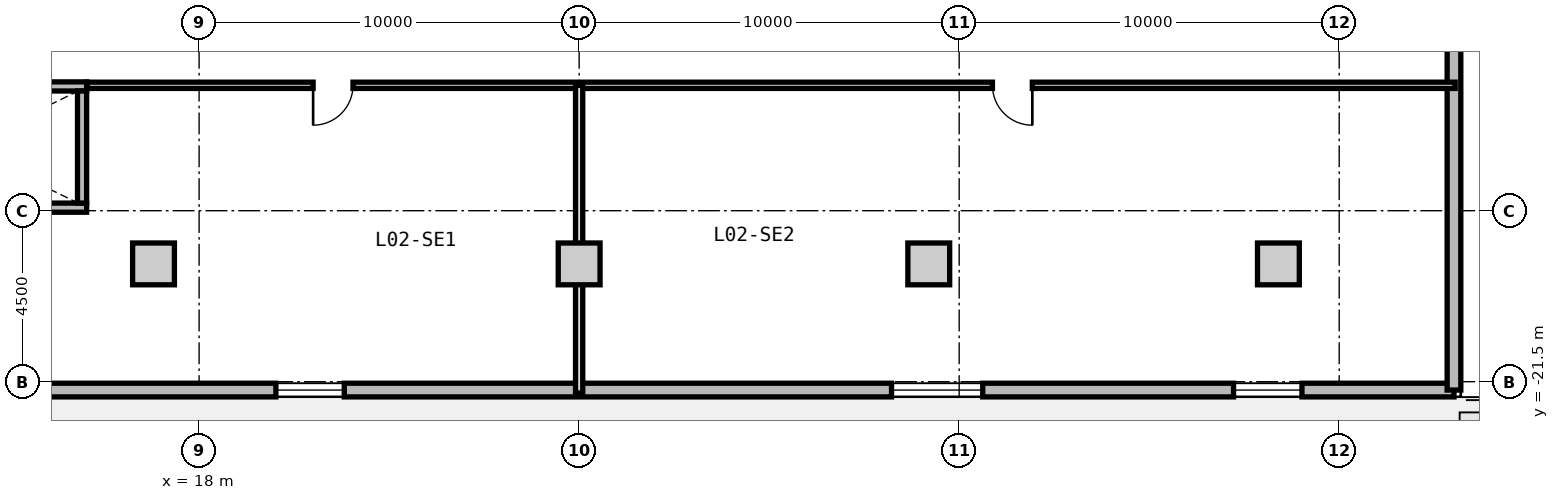
"""IFC4 building model, lengths in metres.
Left out: names, types, materials, properties, quantities, classifications, styles, units other than length and angle.
Written with IfcOpenShell. Run it as: python <this file> out.ifc"""

import sys

from ifc_helpers import new_model, si_unit, direction, frame, frame_2d, origin, origin_2d, place, context, subcontext, project, spatial, rectangle, extrude, source, transform, mapped, element, fill, save


model = new_model("IFC4")
c1 = context("Model", 3, precision=1e-05, world=origin(), true_north=direction((0.0, 1.0)))
c2 = subcontext(c1, "Body", "Model", "MODEL_VIEW")
j1 = project(units=[si_unit("LENGTHUNIT", "METRE"), si_unit("PLANEANGLEUNIT", "RADIAN")], contexts=[c1])
p1 = place(None, origin())
s1 = spatial("IfcSite", under=j1, at=p1, CompositionType="ELEMENT")
p2 = place(p1, origin())
s2 = spatial("IfcBuilding", under=s1, at=p2, CompositionType="ELEMENT")
p3 = place(p2, frame((0.0, 0.0, 8.4)))
s3 = spatial("IfcBuildingStorey", under=s2, at=p3, CompositionType="ELEMENT", Elevation=8.4)
m1 = source(origin(), c2, "Body", "SweptSolid", [
    extrude(rectangle(XDim=1.1, YDim=1.1, at=origin_2d()), origin(), (0.0, 0.0, 1.0), 4.2),
])
for number, where, z_axis, x_axis in (
    (1, (16.8, -18.4, 0.0), (0.0, 0.0, 1.0), (1.0, 0.0, 0.0)),
    (2, (28.0, -18.4, 0.0), (0.0, 0.0, 1.0), (1.0, 0.0, 0.0)),
    (3, (37.2, -18.4, 0.0), (0.0, 0.0, 1.0), (1.0, 0.0, 0.0)),
    (4, (46.4, -18.4, 0.0), (0.0, 0.0, 1.0), (1.0, 0.0, 0.0)),
):
    element("IfcColumn", number, at=place(p3, frame(where, z_axis=z_axis, x_axis=x_axis)), inside=s3, PredefinedType="COLUMN", context=c2, shape_type="MappedRepresentation", body=[
        mapped(m1, transform((0.0, 0.0, 0.0), x_axis=(1.0, 0.0, 0.0), y_axis=(0.0, 1.0, 0.0), z_axis=(0.0, 0.0, 1.0), scale=1.0)),
    ])
m2 = source(origin(), c2, "Body", "SweptSolid", [
    extrude(rectangle(XDim=102.04, YDim=0.36, at=frame_2d((51.02, 0.0))), origin(), (0.0, 0.0, 1.0), 3.88),
])
p4 = place(p3, frame((51.02, -21.72, 0.0), z_axis=(0.0, 0.0, 1.0), x_axis=(-1.0, 0.0, 0.0)))
e5 = element("IfcWall", 5, at=p4, inside=s3, PredefinedType="SOLIDWALL", context=c2, shape_type="MappedRepresentation", body=[
    mapped(m2, transform((0.0, 0.0, 0.0), x_axis=(1.0, 0.0, 0.0), y_axis=(0.0, 1.0, 0.0), z_axis=(0.0, 0.0, 1.0), scale=1.0)),
])
p5 = place(p4, frame((53.37, 0.0, 0.0)))
e6 = element("IfcOpeningElement", 6, at=p5, cuts=e5, PredefinedType="OPENING", context=c2, shape_type="SweptSolid", body=[
    extrude(rectangle(XDim=1.15, YDim=2.25, at=frame_2d((0.575, 1.125))), frame((0.0, 0.19, 0.0), z_axis=(0.0, -1.0, 0.0), x_axis=(1.0, 0.0, 0.0)), (0.0, 0.0, 1.0), 0.38),
])
p6 = place(p4, frame((4.0, 0.0, 0.9)))
e7 = element("IfcOpeningElement", 7, at=p6, cuts=e5, PredefinedType="OPENING", context=c2, shape_type="SweptSolid", body=[
    extrude(rectangle(XDim=1.8, YDim=2.0, at=frame_2d((0.9, 1.0))), frame((0.0, 0.19, 0.0), z_axis=(0.0, -1.0, 0.0), x_axis=(1.0, 0.0, 0.0)), (0.0, 0.0, 1.0), 0.38),
])
p7 = place(p4, frame((12.4, 0.0, 0.85)))
e8 = element("IfcOpeningElement", 8, at=p7, cuts=e5, PredefinedType="OPENING", context=c2, shape_type="SweptSolid", body=[
    extrude(rectangle(XDim=2.4, YDim=2.2, at=frame_2d((1.2, 1.1))), frame((0.0, 0.19, 0.0), z_axis=(0.0, -1.0, 0.0), x_axis=(1.0, 0.0, 0.0)), (0.0, 0.0, 1.0), 0.38),
])
p8 = place(p4, frame((29.2, 0.0, 0.9)))
e9 = element("IfcOpeningElement", 9, at=p8, cuts=e5, PredefinedType="OPENING", context=c2, shape_type="SweptSolid", body=[
    extrude(rectangle(XDim=1.8, YDim=2.0, at=frame_2d((0.9, 1.0))), frame((0.0, 0.19, 0.0), z_axis=(0.0, -1.0, 0.0), x_axis=(1.0, 0.0, 0.0)), (0.0, 0.0, 1.0), 0.38),
])
p9 = place(p4, frame((37.6, 0.0, 0.85)))
e10 = element("IfcOpeningElement", 10, at=p9, cuts=e5, PredefinedType="OPENING", context=c2, shape_type="SweptSolid", body=[
    extrude(rectangle(XDim=2.4, YDim=2.2, at=frame_2d((1.2, 1.1))), frame((0.0, 0.19, 0.0), z_axis=(0.0, -1.0, 0.0), x_axis=(1.0, 0.0, 0.0)), (0.0, 0.0, 1.0), 0.38),
])
p10 = place(p4, frame((62.8, 0.0, 0.85)))
e11 = element("IfcOpeningElement", 11, at=p10, cuts=e5, PredefinedType="OPENING", context=c2, shape_type="SweptSolid", body=[
    extrude(rectangle(XDim=2.4, YDim=2.2, at=frame_2d((1.2, 1.1))), frame((0.0, 0.19, 0.0), z_axis=(0.0, -1.0, 0.0), x_axis=(1.0, 0.0, 0.0)), (0.0, 0.0, 1.0), 0.38),
])
p11 = place(p4, frame((71.2, 0.0, 0.85)))
e12 = element("IfcOpeningElement", 12, at=p11, cuts=e5, PredefinedType="OPENING", context=c2, shape_type="SweptSolid", body=[
    extrude(rectangle(XDim=3.0, YDim=2.1, at=frame_2d((1.5, 1.05))), frame((0.0, 0.19, 0.0), z_axis=(0.0, -1.0, 0.0), x_axis=(1.0, 0.0, 0.0)), (0.0, 0.0, 1.0), 0.38),
])
p12 = place(p4, frame((88.0, 0.0, 0.85)))
e13 = element("IfcOpeningElement", 13, at=p12, cuts=e5, PredefinedType="OPENING", context=c2, shape_type="SweptSolid", body=[
    extrude(rectangle(XDim=2.4, YDim=2.2, at=frame_2d((1.2, 1.1))), frame((0.0, 0.19, 0.0), z_axis=(0.0, -1.0, 0.0), x_axis=(1.0, 0.0, 0.0)), (0.0, 0.0, 1.0), 0.38),
])
m3 = source(origin(), c2, "Body", "SweptSolid", [
    extrude(rectangle(XDim=43.44, YDim=0.36, at=frame_2d((21.72, 0.0))), origin(), (0.0, 0.0, 1.0), 3.88),
])
p13 = place(p3, frame((51.02, 21.72, 0.0), z_axis=(0.0, 0.0, 1.0), x_axis=(0.0, -1.0, 0.0)))
e14 = element("IfcWall", 14, at=p13, inside=s3, PredefinedType="SOLIDWALL", context=c2, shape_type="MappedRepresentation", body=[
    mapped(m3, transform((0.0, 0.0, 0.0), x_axis=(1.0, 0.0, 0.0), y_axis=(0.0, 1.0, 0.0), z_axis=(0.0, 0.0, 1.0), scale=1.0)),
])
p14 = place(p13, frame((4.0, 0.0, 0.9)))
e15 = element("IfcOpeningElement", 15, at=p14, cuts=e14, PredefinedType="OPENING", context=c2, shape_type="SweptSolid", body=[
    extrude(rectangle(XDim=1.8, YDim=2.0, at=frame_2d((0.9, 1.0))), frame((0.0, 0.19, 0.0), z_axis=(0.0, -1.0, 0.0), x_axis=(1.0, 0.0, 0.0)), (0.0, 0.0, 1.0), 0.38),
])
p15 = place(p13, frame((29.2, 0.0, 0.9)))
e16 = element("IfcOpeningElement", 16, at=p15, cuts=e14, PredefinedType="OPENING", context=c2, shape_type="SweptSolid", body=[
    extrude(rectangle(XDim=1.8, YDim=2.0, at=frame_2d((0.9, 1.0))), frame((0.0, 0.19, 0.0), z_axis=(0.0, -1.0, 0.0), x_axis=(1.0, 0.0, 0.0)), (0.0, 0.0, 1.0), 0.38),
])
m4 = source(origin(), c2, "Body", "SweptSolid", [
    extrude(rectangle(XDim=7.88, YDim=0.24, at=frame_2d((3.94, 0.0))), origin(), (0.0, 0.0, 1.0), 3.88),
])
p16 = place(p3, frame((7.16, -13.73, 0.0), z_axis=(0.0, 0.0, 1.0), x_axis=(1.0, 0.0, 0.0)))
e17 = element("IfcWall", 17, at=p16, inside=s3, PredefinedType="PARTITIONING", context=c2, shape_type="MappedRepresentation", body=[
    mapped(m4, transform((0.0, 0.0, 0.0), x_axis=(1.0, 0.0, 0.0), y_axis=(0.0, 1.0, 0.0), z_axis=(0.0, 0.0, 1.0), scale=1.0)),
])
p17 = place(p16, frame((0.37, 0.0, 0.0)))
e18 = element("IfcOpeningElement", 18, at=p17, cuts=e17, PredefinedType="OPENING", context=c2, shape_type="SweptSolid", body=[
    extrude(rectangle(XDim=1.1, YDim=2.15, at=frame_2d((0.55, 1.075))), frame((0.0, 0.13, 0.0), z_axis=(0.0, -1.0, 0.0), x_axis=(1.0, 0.0, 0.0)), (0.0, 0.0, 1.0), 0.26),
])
p18 = place(p3, frame((7.16, -16.92, 0.0), z_axis=(0.0, 0.0, 1.0), x_axis=(1.0, 0.0, 0.0)))
e19 = element("IfcWall", 19, at=p18, inside=s3, PredefinedType="PARTITIONING", context=c2, shape_type="MappedRepresentation", body=[
    mapped(m4, transform((0.0, 0.0, 0.0), x_axis=(1.0, 0.0, 0.0), y_axis=(0.0, 1.0, 0.0), z_axis=(0.0, 0.0, 1.0), scale=1.0)),
])
m5 = source(origin(), c2, "Body", "SweptSolid", [
    extrude(rectangle(XDim=2.95, YDim=0.24, at=frame_2d((1.475, 0.0))), origin(), (0.0, 0.0, 1.0), 3.88),
])
p19 = place(p3, frame((14.92, -16.8, 0.0), z_axis=(0.0, 0.0, 1.0), x_axis=(0.0, 1.0, 0.0)))
e20 = element("IfcWall", 20, at=p19, inside=s3, PredefinedType="PARTITIONING", context=c2, shape_type="MappedRepresentation", body=[
    mapped(m5, transform((0.0, 0.0, 0.0), x_axis=(1.0, 0.0, 0.0), y_axis=(0.0, 1.0, 0.0), z_axis=(0.0, 0.0, 1.0), scale=1.0)),
])
m6 = source(origin(), c2, "Body", "SweptSolid", [
    extrude(rectangle(XDim=36.0, YDim=0.165, at=frame_2d((18.0, 0.0))), origin(), (0.0, 0.0, 1.0), 3.865),
])
p20 = place(p3, frame((15.05, -13.7, 0.0), z_axis=(0.0, 0.0, 1.0), x_axis=(1.0, 0.0, 0.0)))
e21 = element("IfcWall", 21, at=p20, inside=s3, PredefinedType="PARTITIONING", context=c2, shape_type="MappedRepresentation", body=[
    mapped(m6, transform((0.0, 0.0, 0.0), x_axis=(1.0, 0.0, 0.0), y_axis=(0.0, 1.0, 0.0), z_axis=(0.0, 0.0, 1.0), scale=1.0)),
])
p21 = place(p20, frame((5.95, 0.0, 0.0)))
e22 = element("IfcOpeningElement", 22, at=p21, cuts=e21, PredefinedType="OPENING", context=c2, shape_type="SweptSolid", body=[
    extrude(rectangle(XDim=1.05, YDim=2.15, at=frame_2d((0.525, 1.075))), frame((0.0, 0.093, 0.0), z_axis=(0.0, -1.0, 0.0), x_axis=(1.0, 0.0, 0.0)), (0.0, 0.0, 1.0), 0.185),
])
p22 = place(p20, frame((23.825, 0.0, 0.0)))
e23 = element("IfcOpeningElement", 23, at=p22, cuts=e21, PredefinedType="OPENING", context=c2, shape_type="SweptSolid", body=[
    extrude(rectangle(XDim=1.05, YDim=2.15, at=frame_2d((0.525, 1.075))), frame((0.0, 0.093, 0.0), z_axis=(0.0, -1.0, 0.0), x_axis=(1.0, 0.0, 0.0)), (0.0, 0.0, 1.0), 0.185),
])
m7 = source(origin(), c2, "Body", "SweptSolid", [
    extrude(rectangle(XDim=8.1, YDim=0.19, at=frame_2d((4.05, 0.0))), origin(), (0.0, 0.0, 1.0), 3.865),
])
p23 = place(p3, frame((28.0, -21.8, 0.0), z_axis=(0.0, 0.0, 1.0), x_axis=(0.0, 1.0, 0.0)))
e24 = element("IfcWall", 24, at=p23, inside=s3, PredefinedType="PARTITIONING", context=c2, shape_type="MappedRepresentation", body=[
    mapped(m7, transform((0.0, 0.0, 0.0), x_axis=(1.0, 0.0, 0.0), y_axis=(0.0, 1.0, 0.0), z_axis=(0.0, 0.0, 1.0), scale=1.0)),
])
m8 = source(origin(), c2, "Body", "SweptSolid", [
    extrude(rectangle(XDim=1.8, YDim=2.0, at=frame_2d((0.9, 1.0))), frame((0.0, 0.03, 0.0), z_axis=(0.0, -1.0, 0.0), x_axis=(1.0, 0.0, 0.0)), (0.0, 0.0, 1.0), 0.06),
])
p24 = place(p6, origin())
e25 = element("IfcWindow", 25, at=p24, inside=s3, PartitioningType="SINGLE_PANEL", PredefinedType="WINDOW", context=c2, shape_type="MappedRepresentation", body=[
    mapped(m8, transform((0.0, 0.0, 0.0), x_axis=(1.0, 0.0, 0.0), y_axis=(0.0, 1.0, 0.0), z_axis=(0.0, 0.0, 1.0), scale=1.0)),
])
fill(e7, e25)
m9 = source(origin(), c2, "Body", "SweptSolid", [
    extrude(rectangle(XDim=2.4, YDim=2.2, at=frame_2d((1.2, 1.1))), frame((0.0, 0.03, 0.0), z_axis=(0.0, -1.0, 0.0), x_axis=(1.0, 0.0, 0.0)), (0.0, 0.0, 1.0), 0.06),
])
p25 = place(p7, origin())
e26 = element("IfcWindow", 26, at=p25, inside=s3, PartitioningType="SINGLE_PANEL", PredefinedType="WINDOW", context=c2, shape_type="MappedRepresentation", body=[
    mapped(m9, transform((0.0, 0.0, 0.0), x_axis=(1.0, 0.0, 0.0), y_axis=(0.0, 1.0, 0.0), z_axis=(0.0, 0.0, 1.0), scale=1.0)),
])
fill(e8, e26)
p26 = place(p8, origin())
e27 = element("IfcWindow", 27, at=p26, inside=s3, PartitioningType="SINGLE_PANEL", PredefinedType="WINDOW", context=c2, shape_type="MappedRepresentation", body=[
    mapped(m8, transform((0.0, 0.0, 0.0), x_axis=(1.0, 0.0, 0.0), y_axis=(0.0, 1.0, 0.0), z_axis=(0.0, 0.0, 1.0), scale=1.0)),
])
fill(e9, e27)
m10 = source(origin(), c2, "Body", "SweptSolid", [
    extrude(rectangle(XDim=1.05, YDim=2.15, at=frame_2d((0.525, 1.075))), frame((0.0, 0.025, 0.0), z_axis=(0.0, -1.0, 0.0), x_axis=(1.0, 0.0, 0.0)), (0.0, 0.0, 1.0), 0.05),
])
p27 = place(p21, frame((1.05, 0.0, 0.0), z_axis=(0.0, 0.0, 1.0), x_axis=(-1.0, 0.0, 0.0)))
e28 = element("IfcDoor", 28, at=p27, inside=s3, OperationType="SINGLE_SWING_RIGHT", PredefinedType="DOOR", context=c2, shape_type="MappedRepresentation", body=[
    mapped(m10, transform((0.0, 0.0, 0.0), x_axis=(1.0, 0.0, 0.0), y_axis=(0.0, 1.0, 0.0), z_axis=(0.0, 0.0, 1.0), scale=1.0)),
])
fill(e22, e28)
p28 = place(p22, frame((1.05, 0.0, 0.0), z_axis=(0.0, 0.0, 1.0), x_axis=(-1.0, 0.0, 0.0)))
e29 = element("IfcDoor", 29, at=p28, inside=s3, OperationType="SINGLE_SWING_LEFT", PredefinedType="DOOR", context=c2, shape_type="MappedRepresentation", body=[
    mapped(m10, transform((0.0, 0.0, 0.0), x_axis=(1.0, 0.0, 0.0), y_axis=(0.0, 1.0, 0.0), z_axis=(0.0, 0.0, 1.0), scale=1.0)),
])
fill(e23, e29)
save(model, sys.argv[1])
